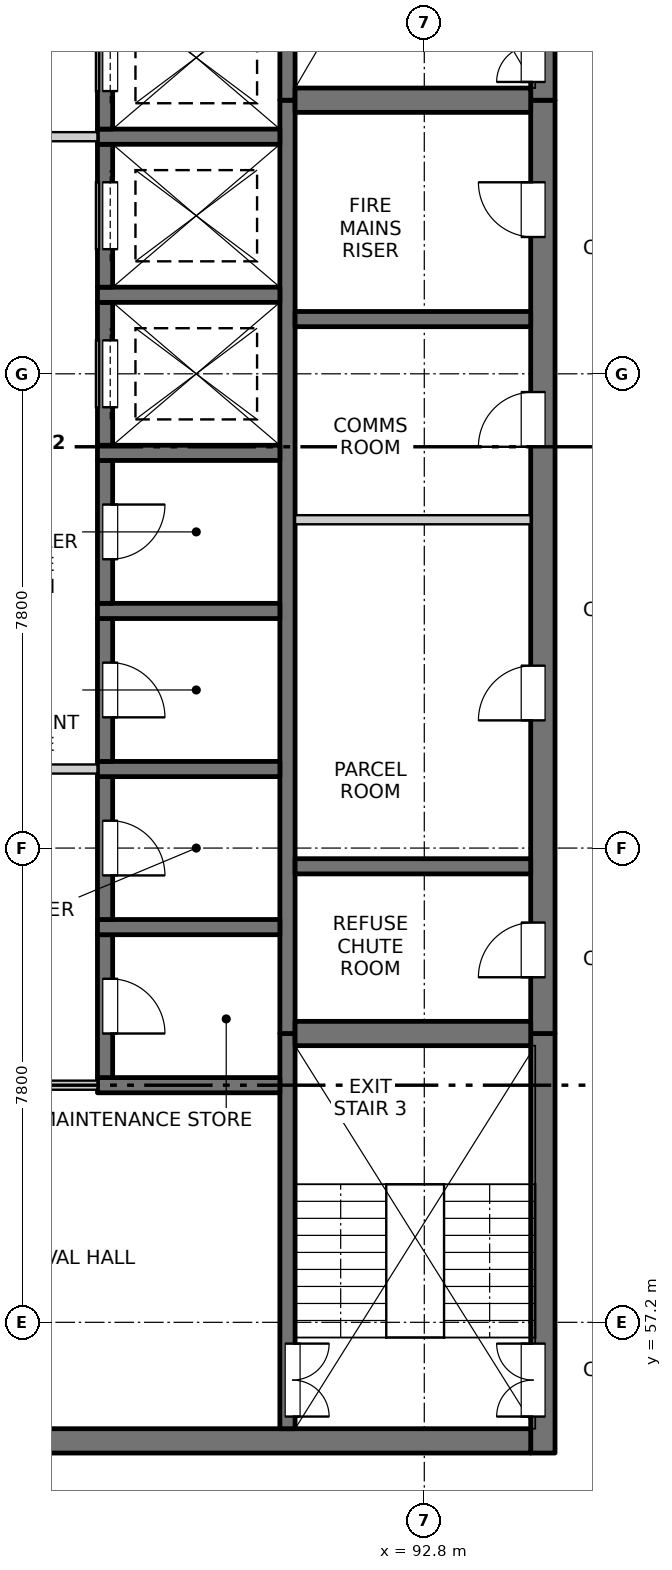
"""IFC4 building model, lengths in metres.
Left out: names, types, materials, properties, quantities, classifications, styles, units other than length and angle.
Written with IfcOpenShell. Run it as: python <this file> out.ifc"""

import sys

from ifc_helpers import new_model, si_unit, direction, frame, frame_2d, origin, place, context, subcontext, project, spatial, rectangle, extrude, element, fill, save


model = new_model("IFC4")
c1 = context("Model", 3, precision=1e-05, world=origin(), true_north=direction((0.0, 1.0)))
c2 = subcontext(c1, "Body", "Model", "MODEL_VIEW")
j1 = project(units=[si_unit("LENGTHUNIT", "METRE"), si_unit("PLANEANGLEUNIT", "RADIAN")], contexts=[c1])
p1 = place(None, origin())
s1 = spatial("IfcSite", under=j1, at=p1, CompositionType="ELEMENT")
p2 = place(p1, origin())
s2 = spatial("IfcBuilding", under=s1, at=p2, CompositionType="ELEMENT")
p3 = place(p2, frame((0.0, 0.0, 200.7)))
s3 = spatial("IfcBuildingStorey", under=s2, at=p3, CompositionType="ELEMENT", Elevation=200.7)
p4 = place(p3, frame((94.75, 55.05, -0.25), z_axis=(0.0, 0.0, 1.0), x_axis=(0.0, 1.0, 0.0)))
e1 = element("IfcWall", 1, at=p4, inside=s3, PredefinedType="SOLIDWALL", context=c2, shape_type="SweptSolid", body=[
    extrude(rectangle(XDim=6.9, YDim=0.4, at=frame_2d((3.45, 0.0))), origin(), (0.0, 0.0, 1.0), 3.4),
])
p5 = place(p4, frame((0.6, 0.0, 0.25)))
e2 = element("IfcOpeningElement", 2, at=p5, cuts=e1, PredefinedType="OPENING", context=c2, shape_type="SweptSolid", body=[
    extrude(rectangle(XDim=1.2, YDim=2.1, at=frame_2d((0.6, 1.05))), frame((0.0, 0.21, 0.0), z_axis=(0.0, -1.0, 0.0), x_axis=(1.0, 0.0, 0.0)), (0.0, 0.0, 1.0), 0.42),
])
p6 = place(p3, frame((94.75, 61.95, -0.25), z_axis=(0.0, 0.0, 1.0), x_axis=(0.0, 1.0, 0.0)))
e3 = element("IfcWall", 3, at=p6, inside=s3, PredefinedType="SOLIDWALL", context=c2, shape_type="SweptSolid", body=[
    extrude(rectangle(XDim=15.35, YDim=0.4, at=frame_2d((7.675, 0.0))), origin(), (0.0, 0.0, 1.0), 3.4),
])
p7 = place(p6, frame((0.925, 0.0, 0.25)))
e4 = element("IfcOpeningElement", 4, at=p7, cuts=e3, PredefinedType="OPENING", context=c2, shape_type="SweptSolid", body=[
    extrude(rectangle(XDim=0.9, YDim=2.1, at=frame_2d((0.45, 1.05))), frame((0.0, 0.21, 0.0), z_axis=(0.0, -1.0, 0.0), x_axis=(1.0, 0.0, 0.0)), (0.0, 0.0, 1.0), 0.42),
])
p8 = place(p6, frame((5.15, 0.0, 0.25)))
e5 = element("IfcOpeningElement", 5, at=p8, cuts=e3, PredefinedType="OPENING", context=c2, shape_type="SweptSolid", body=[
    extrude(rectangle(XDim=0.9, YDim=2.1, at=frame_2d((0.45, 1.05))), frame((0.0, 0.21, 0.0), z_axis=(0.0, -1.0, 0.0), x_axis=(1.0, 0.0, 0.0)), (0.0, 0.0, 1.0), 0.42),
])
p9 = place(p6, frame((9.65, 0.0, 0.25)))
e6 = element("IfcOpeningElement", 6, at=p9, cuts=e3, PredefinedType="OPENING", context=c2, shape_type="SweptSolid", body=[
    extrude(rectangle(XDim=0.9, YDim=2.1, at=frame_2d((0.45, 1.05))), frame((0.0, 0.21, 0.0), z_axis=(0.0, -1.0, 0.0), x_axis=(1.0, 0.0, 0.0)), (0.0, 0.0, 1.0), 0.42),
])
p10 = place(p6, frame((13.1, 0.0, 0.25)))
e7 = element("IfcOpeningElement", 7, at=p10, cuts=e3, PredefinedType="OPENING", context=c2, shape_type="SweptSolid", body=[
    extrude(rectangle(XDim=0.9, YDim=2.1, at=frame_2d((0.45, 1.05))), frame((0.0, 0.21, 0.0), z_axis=(0.0, -1.0, 0.0), x_axis=(1.0, 0.0, 0.0)), (0.0, 0.0, 1.0), 0.42),
])
p11 = place(p3, frame((94.75, 77.3, -0.25), z_axis=(0.0, 0.0, 1.0), x_axis=(0.0, 1.0, 0.0)))
e8 = element("IfcWall", 8, at=p11, inside=s3, PredefinedType="SOLIDWALL", context=c2, shape_type="SweptSolid", body=[
    extrude(rectangle(XDim=7.4, YDim=0.4, at=frame_2d((3.7, 0.0))), origin(), (0.0, 0.0, 1.0), 3.4),
])
p12 = place(p11, frame((0.3, 0.0, 0.25)))
e9 = element("IfcOpeningElement", 9, at=p12, cuts=e8, PredefinedType="OPENING", context=c2, shape_type="SweptSolid", body=[
    extrude(rectangle(XDim=1.2, YDim=2.1, at=frame_2d((0.6, 1.05))), frame((0.0, 0.21, 0.0), z_axis=(0.0, -1.0, 0.0), x_axis=(1.0, 0.0, 0.0)), (0.0, 0.0, 1.0), 0.42),
])
p13 = place(p3, frame((75.45, 55.25, -0.25), z_axis=(0.0, 0.0, 1.0), x_axis=(1.0, 0.0, 0.0)))
e10 = element("IfcWall", 10, at=p13, inside=s3, PredefinedType="SOLIDWALL", context=c2, shape_type="SweptSolid", body=[
    extrude(rectangle(XDim=19.1, YDim=0.4, at=frame_2d((9.55, 0.0))), origin(), (0.0, 0.0, 1.0), 3.4),
])
p14 = place(p13, frame((8.8, 0.0, 0.25)))
e11 = element("IfcOpeningElement", 11, at=p14, cuts=e10, PredefinedType="OPENING", context=c2, shape_type="SweptSolid", body=[
    extrude(rectangle(XDim=1.5, YDim=2.1, at=frame_2d((0.75, 1.05))), frame((0.0, 0.21, 0.0), z_axis=(0.0, -1.0, 0.0), x_axis=(1.0, 0.0, 0.0)), (0.0, 0.0, 1.0), 0.42),
])
p15 = place(p3, frame((90.55, 55.45, -0.25), z_axis=(0.0, 0.0, 1.0), x_axis=(0.0, 1.0, 0.0)))
e12 = element("IfcWall", 12, at=p15, inside=s3, PredefinedType="SOLIDWALL", context=c2, shape_type="SweptSolid", body=[
    extrude(rectangle(XDim=6.5, YDim=0.25, at=frame_2d((3.25, 0.0))), origin(), (0.0, 0.0, 1.0), 3.4),
])
p16 = place(p15, frame((0.2, 0.0, 0.25)))
e13 = element("IfcOpeningElement", 13, at=p16, cuts=e12, PredefinedType="OPENING", context=c2, shape_type="SweptSolid", body=[
    extrude(rectangle(XDim=1.2, YDim=2.1, at=frame_2d((0.6, 1.05))), frame((0.0, 0.135, 0.0), z_axis=(0.0, -1.0, 0.0), x_axis=(1.0, 0.0, 0.0)), (0.0, 0.0, 1.0), 0.27),
])
p17 = place(p3, frame((90.55, 61.95, -0.25), z_axis=(0.0, 0.0, 1.0), x_axis=(0.0, 1.0, 0.0)))
e14 = element("IfcWall", 14, at=p17, inside=s3, PredefinedType="SOLIDWALL", context=c2, shape_type="SweptSolid", body=[
    extrude(rectangle(XDim=15.35, YDim=0.25, at=frame_2d((7.675, 0.0))), origin(), (0.0, 0.0, 1.0), 3.4),
])
p18 = place(p3, frame((90.55, 77.3, -0.25), z_axis=(0.0, 0.0, 1.0), x_axis=(0.0, 1.0, 0.0)))
e15 = element("IfcWall", 15, at=p18, inside=s3, PredefinedType="SOLIDWALL", context=c2, shape_type="SweptSolid", body=[
    extrude(rectangle(XDim=7.0, YDim=0.25, at=frame_2d((3.5, 0.0))), origin(), (0.0, 0.0, 1.0), 3.4),
])
p19 = place(p3, frame((87.425, 61.1, -0.25), z_axis=(0.0, 0.0, 1.0), x_axis=(1.0, 0.0, 0.0)))
e16 = element("IfcWall", 16, at=p19, inside=s3, PredefinedType="SOLIDWALL", context=c2, shape_type="SweptSolid", body=[
    extrude(rectangle(XDim=3.0, YDim=0.25, at=frame_2d((1.5, 0.0))), origin(), (0.0, 0.0, 1.0), 3.4),
])
p20 = place(p3, frame((87.55, 61.225, -0.25), z_axis=(0.0, 0.0, 1.0), x_axis=(0.0, 1.0, 0.0)))
e17 = element("IfcWall", 17, at=p20, inside=s3, PredefinedType="SOLIDWALL", context=c2, shape_type="SweptSolid", body=[
    extrude(rectangle(XDim=2.35, YDim=0.25, at=frame_2d((1.175, 0.0))), origin(), (0.0, 0.0, 1.0), 3.4),
])
p21 = place(p20, frame((0.725, 0.0, 0.25)))
e18 = element("IfcOpeningElement", 18, at=p21, cuts=e17, PredefinedType="OPENING", context=c2, shape_type="SweptSolid", body=[
    extrude(rectangle(XDim=0.9, YDim=2.1, at=frame_2d((0.45, 1.05))), frame((0.0, 0.135, 0.0), z_axis=(0.0, -1.0, 0.0), x_axis=(1.0, 0.0, 0.0)), (0.0, 0.0, 1.0), 0.27),
])
p22 = place(p3, frame((87.425, 63.7, -0.25), z_axis=(0.0, 0.0, 1.0), x_axis=(1.0, 0.0, 0.0)))
e19 = element("IfcWall", 19, at=p22, inside=s3, PredefinedType="SOLIDWALL", context=c2, shape_type="SweptSolid", body=[
    extrude(rectangle(XDim=3.0, YDim=0.25, at=frame_2d((1.5, 0.0))), origin(), (0.0, 0.0, 1.0), 3.4),
])
p23 = place(p3, frame((87.55, 63.825, -0.25), z_axis=(0.0, 0.0, 1.0), x_axis=(0.0, 1.0, 0.0)))
e20 = element("IfcWall", 20, at=p23, inside=s3, PredefinedType="SOLIDWALL", context=c2, shape_type="SweptSolid", body=[
    extrude(rectangle(XDim=2.35, YDim=0.25, at=frame_2d((1.175, 0.0))), origin(), (0.0, 0.0, 1.0), 3.4),
])
p24 = place(p23, frame((0.725, 0.0, 0.25)))
e21 = element("IfcOpeningElement", 21, at=p24, cuts=e20, PredefinedType="OPENING", context=c2, shape_type="SweptSolid", body=[
    extrude(rectangle(XDim=0.9, YDim=2.1, at=frame_2d((0.45, 1.05))), frame((0.0, 0.135, 0.0), z_axis=(0.0, -1.0, 0.0), x_axis=(1.0, 0.0, 0.0)), (0.0, 0.0, 1.0), 0.27),
])
p25 = place(p3, frame((87.425, 66.3, -0.25), z_axis=(0.0, 0.0, 1.0), x_axis=(1.0, 0.0, 0.0)))
e22 = element("IfcWall", 22, at=p25, inside=s3, PredefinedType="SOLIDWALL", context=c2, shape_type="SweptSolid", body=[
    extrude(rectangle(XDim=3.0, YDim=0.25, at=frame_2d((1.5, 0.0))), origin(), (0.0, 0.0, 1.0), 3.4),
])
p26 = place(p3, frame((87.55, 66.425, -0.25), z_axis=(0.0, 0.0, 1.0), x_axis=(0.0, 1.0, 0.0)))
e23 = element("IfcWall", 23, at=p26, inside=s3, PredefinedType="SOLIDWALL", context=c2, shape_type="SweptSolid", body=[
    extrude(rectangle(XDim=2.35, YDim=0.25, at=frame_2d((1.175, 0.0))), origin(), (0.0, 0.0, 1.0), 3.4),
])
p27 = place(p26, frame((0.725, 0.0, 0.25)))
e24 = element("IfcOpeningElement", 24, at=p27, cuts=e23, PredefinedType="OPENING", context=c2, shape_type="SweptSolid", body=[
    extrude(rectangle(XDim=0.9, YDim=2.1, at=frame_2d((0.45, 1.05))), frame((0.0, 0.135, 0.0), z_axis=(0.0, -1.0, 0.0), x_axis=(1.0, 0.0, 0.0)), (0.0, 0.0, 1.0), 0.27),
])
p28 = place(p3, frame((87.425, 68.9, -0.25), z_axis=(0.0, 0.0, 1.0), x_axis=(1.0, 0.0, 0.0)))
e25 = element("IfcWall", 25, at=p28, inside=s3, PredefinedType="SOLIDWALL", context=c2, shape_type="SweptSolid", body=[
    extrude(rectangle(XDim=3.0, YDim=0.25, at=frame_2d((1.5, 0.0))), origin(), (0.0, 0.0, 1.0), 3.4),
])
p29 = place(p3, frame((87.55, 69.025, -0.25), z_axis=(0.0, 0.0, 1.0), x_axis=(0.0, 1.0, 0.0)))
e26 = element("IfcWall", 26, at=p29, inside=s3, PredefinedType="SOLIDWALL", context=c2, shape_type="SweptSolid", body=[
    extrude(rectangle(XDim=2.35, YDim=0.25, at=frame_2d((1.175, 0.0))), origin(), (0.0, 0.0, 1.0), 3.4),
])
p30 = place(p29, frame((0.725, 0.0, 0.25)))
e27 = element("IfcOpeningElement", 27, at=p30, cuts=e26, PredefinedType="OPENING", context=c2, shape_type="SweptSolid", body=[
    extrude(rectangle(XDim=0.9, YDim=2.1, at=frame_2d((0.45, 1.05))), frame((0.0, 0.135, 0.0), z_axis=(0.0, -1.0, 0.0), x_axis=(1.0, 0.0, 0.0)), (0.0, 0.0, 1.0), 0.27),
])
p31 = place(p3, frame((87.425, 71.5, -0.25), z_axis=(0.0, 0.0, 1.0), x_axis=(1.0, 0.0, 0.0)))
e28 = element("IfcWall", 28, at=p31, inside=s3, PredefinedType="SOLIDWALL", context=c2, shape_type="SweptSolid", body=[
    extrude(rectangle(XDim=3.0, YDim=0.25, at=frame_2d((1.5, 0.0))), origin(), (0.0, 0.0, 1.0), 3.4),
])
p32 = place(p3, frame((87.55, 71.625, -0.25), z_axis=(0.0, 0.0, 1.0), x_axis=(0.0, 1.0, 0.0)))
e29 = element("IfcWall", 29, at=p32, inside=s3, PredefinedType="SOLIDWALL", context=c2, shape_type="SweptSolid", body=[
    extrude(rectangle(XDim=2.35, YDim=0.25, at=frame_2d((1.175, 0.0))), origin(), (0.0, 0.0, 1.0), 3.4),
])
p33 = place(p32, frame((0.625, 0.0, 0.25)))
e30 = element("IfcOpeningElement", 30, at=p33, cuts=e29, PredefinedType="OPENING", context=c2, shape_type="SweptSolid", body=[
    extrude(rectangle(XDim=1.1, YDim=2.1, at=frame_2d((0.55, 1.05))), frame((0.0, 0.135, 0.0), z_axis=(0.0, -1.0, 0.0), x_axis=(1.0, 0.0, 0.0)), (0.0, 0.0, 1.0), 0.27),
])
p34 = place(p3, frame((87.425, 74.1, -0.25), z_axis=(0.0, 0.0, 1.0), x_axis=(1.0, 0.0, 0.0)))
e31 = element("IfcWall", 31, at=p34, inside=s3, PredefinedType="SOLIDWALL", context=c2, shape_type="SweptSolid", body=[
    extrude(rectangle(XDim=3.0, YDim=0.25, at=frame_2d((1.5, 0.0))), origin(), (0.0, 0.0, 1.0), 3.4),
])
p35 = place(p3, frame((87.55, 74.225, -0.25), z_axis=(0.0, 0.0, 1.0), x_axis=(0.0, 1.0, 0.0)))
e32 = element("IfcWall", 32, at=p35, inside=s3, PredefinedType="SOLIDWALL", context=c2, shape_type="SweptSolid", body=[
    extrude(rectangle(XDim=2.35, YDim=0.25, at=frame_2d((1.175, 0.0))), origin(), (0.0, 0.0, 1.0), 3.4),
])
p36 = place(p35, frame((0.625, 0.0, 0.25)))
e33 = element("IfcOpeningElement", 33, at=p36, cuts=e32, PredefinedType="OPENING", context=c2, shape_type="SweptSolid", body=[
    extrude(rectangle(XDim=1.1, YDim=2.1, at=frame_2d((0.55, 1.05))), frame((0.0, 0.135, 0.0), z_axis=(0.0, -1.0, 0.0), x_axis=(1.0, 0.0, 0.0)), (0.0, 0.0, 1.0), 0.27),
])
p37 = place(p3, frame((87.425, 76.7, -0.25), z_axis=(0.0, 0.0, 1.0), x_axis=(1.0, 0.0, 0.0)))
e34 = element("IfcWall", 34, at=p37, inside=s3, PredefinedType="SOLIDWALL", context=c2, shape_type="SweptSolid", body=[
    extrude(rectangle(XDim=3.0, YDim=0.25, at=frame_2d((1.5, 0.0))), origin(), (0.0, 0.0, 1.0), 3.4),
])
p38 = place(p3, frame((87.55, 76.825, -0.25), z_axis=(0.0, 0.0, 1.0), x_axis=(0.0, 1.0, 0.0)))
e35 = element("IfcWall", 35, at=p38, inside=s3, PredefinedType="SOLIDWALL", context=c2, shape_type="SweptSolid", body=[
    extrude(rectangle(XDim=2.35, YDim=0.25, at=frame_2d((1.175, 0.0))), origin(), (0.0, 0.0, 1.0), 3.4),
])
p39 = place(p38, frame((0.625, 0.0, 0.25)))
e36 = element("IfcOpeningElement", 36, at=p39, cuts=e35, PredefinedType="OPENING", context=c2, shape_type="SweptSolid", body=[
    extrude(rectangle(XDim=1.1, YDim=2.1, at=frame_2d((0.55, 1.05))), frame((0.0, 0.135, 0.0), z_axis=(0.0, -1.0, 0.0), x_axis=(1.0, 0.0, 0.0)), (0.0, 0.0, 1.0), 0.27),
])
p40 = place(p3, frame((90.675, 61.95, -0.25), z_axis=(0.0, 0.0, 1.0), x_axis=(1.0, 0.0, 0.0)))
e37 = element("IfcWall", 37, at=p40, inside=s3, PredefinedType="SOLIDWALL", context=c2, shape_type="SweptSolid", body=[
    extrude(rectangle(XDim=3.875, YDim=0.4, at=frame_2d((1.938, 0.0))), origin(), (0.0, 0.0, 1.0), 3.4),
])
for number, where, z_axis, x_axis in (
    (38, (90.675, 64.7, -0.25), (0.0, 0.0, 1.0), (1.0, 0.0, 0.0)),
    (39, (90.675, 73.7, -0.25), (0.0, 0.0, 1.0), (1.0, 0.0, 0.0)),
):
    element("IfcWall", number, at=place(p3, frame(where, z_axis=z_axis, x_axis=x_axis)), inside=s3, PredefinedType="SOLIDWALL", context=c2, shape_type="SweptSolid", body=[
        extrude(rectangle(XDim=3.875, YDim=0.25, at=frame_2d((1.938, 0.0))), origin(), (0.0, 0.0, 1.0), 3.4),
    ])
p41 = place(p3, frame((90.675, 77.3, -0.25), z_axis=(0.0, 0.0, 1.0), x_axis=(1.0, 0.0, 0.0)))
e40 = element("IfcWall", 40, at=p41, inside=s3, PredefinedType="SOLIDWALL", context=c2, shape_type="SweptSolid", body=[
    extrude(rectangle(XDim=3.875, YDim=0.4, at=frame_2d((1.938, 0.0))), origin(), (0.0, 0.0, 1.0), 3.4),
])
p42 = place(p3, frame((82.575, 61.1, 0.0), z_axis=(0.0, 0.0, 1.0), x_axis=(1.0, 0.0, 0.0)))
e41 = element("IfcWall", 41, at=p42, inside=s3, PredefinedType="PARTITIONING", context=c2, shape_type="SweptSolid", body=[
    extrude(rectangle(XDim=4.85, YDim=0.15, at=frame_2d((2.425, 0.0))), origin(), (0.0, 0.0, 1.0), 3.15),
])
p43 = place(p42, frame((1.525, 0.0, 0.0)))
e42 = element("IfcOpeningElement", 42, at=p43, cuts=e41, PredefinedType="OPENING", context=c2, shape_type="SweptSolid", body=[
    extrude(rectangle(XDim=1.8, YDim=2.1, at=frame_2d((0.9, 1.05))), frame((0.0, 0.085, 0.0), z_axis=(0.0, -1.0, 0.0), x_axis=(1.0, 0.0, 0.0)), (0.0, 0.0, 1.0), 0.17),
])
p44 = place(p3, frame((82.575, 66.3, 0.0), z_axis=(0.0, 0.0, 1.0), x_axis=(1.0, 0.0, 0.0)))
e43 = element("IfcWall", 43, at=p44, inside=s3, PredefinedType="PARTITIONING", context=c2, shape_type="SweptSolid", body=[
    extrude(rectangle(XDim=4.85, YDim=0.15, at=frame_2d((2.425, 0.0))), origin(), (0.0, 0.0, 1.0), 3.15),
])
p45 = place(p44, frame((1.525, 0.0, 0.0)))
e44 = element("IfcOpeningElement", 44, at=p45, cuts=e43, PredefinedType="OPENING", context=c2, shape_type="SweptSolid", body=[
    extrude(rectangle(XDim=1.8, YDim=2.1, at=frame_2d((0.9, 1.05))), frame((0.0, 0.085, 0.0), z_axis=(0.0, -1.0, 0.0), x_axis=(1.0, 0.0, 0.0)), (0.0, 0.0, 1.0), 0.17),
])
p46 = place(p3, frame((90.675, 70.4, 0.0), z_axis=(0.0, 0.0, 1.0), x_axis=(1.0, 0.0, 0.0)))
e45 = element("IfcWall", 45, at=p46, inside=s3, PredefinedType="PARTITIONING", context=c2, shape_type="SweptSolid", body=[
    extrude(rectangle(XDim=3.875, YDim=0.15, at=frame_2d((1.938, 0.0))), origin(), (0.0, 0.0, 1.0), 3.15),
])
p47 = place(p3, frame((82.575, 76.7, 0.0), z_axis=(0.0, 0.0, 1.0), x_axis=(1.0, 0.0, 0.0)))
e46 = element("IfcWall", 46, at=p47, inside=s3, PredefinedType="PARTITIONING", context=c2, shape_type="SweptSolid", body=[
    extrude(rectangle(XDim=4.85, YDim=0.15, at=frame_2d((2.425, 0.0))), origin(), (0.0, 0.0, 1.0), 3.15),
])
p48 = place(p47, frame((1.525, 0.0, 0.0)))
e47 = element("IfcOpeningElement", 47, at=p48, cuts=e46, PredefinedType="OPENING", context=c2, shape_type="SweptSolid", body=[
    extrude(rectangle(XDim=1.8, YDim=2.1, at=frame_2d((0.9, 1.05))), frame((0.0, 0.085, 0.0), z_axis=(0.0, -1.0, 0.0), x_axis=(1.0, 0.0, 0.0)), (0.0, 0.0, 1.0), 0.17),
])
p49 = place(p16, origin())
e48 = element("IfcDoor", 48, at=p49, inside=s3, OperationType="DOUBLE_DOOR_SINGLE_SWING", PredefinedType="DOOR", context=c2, shape_type="SweptSolid", body=[
    extrude(rectangle(XDim=1.2, YDim=2.1, at=frame_2d((0.6, 1.05))), frame((0.0, -0.06, 0.0), z_axis=(0.0, -1.0, 0.0), x_axis=(1.0, 0.0, 0.0)), (0.0, 0.0, 1.0), 0.05),
])
fill(e13, e48)
p50 = place(p5, origin())
e49 = element("IfcDoor", 49, at=p50, inside=s3, OperationType="DOUBLE_DOOR_SINGLE_SWING", PredefinedType="DOOR", context=c2, shape_type="SweptSolid", body=[
    extrude(rectangle(XDim=1.2, YDim=2.1, at=frame_2d((0.6, 1.05))), frame((0.0, 0.185, 0.0), z_axis=(0.0, -1.0, 0.0), x_axis=(1.0, 0.0, 0.0)), (0.0, 0.0, 1.0), 0.05),
])
fill(e2, e49)
p51 = place(p21, origin())
e50 = element("IfcDoor", 50, at=p51, inside=s3, OperationType="SINGLE_SWING_RIGHT", PredefinedType="DOOR", context=c2, shape_type="SweptSolid", body=[
    extrude(rectangle(XDim=0.9, YDim=2.1, at=frame_2d((0.45, 1.05))), frame((0.0, -0.06, 0.0), z_axis=(0.0, -1.0, 0.0), x_axis=(1.0, 0.0, 0.0)), (0.0, 0.0, 1.0), 0.05),
])
fill(e18, e50)
p52 = place(p7, origin())
e51 = element("IfcDoor", 51, at=p52, inside=s3, OperationType="SINGLE_SWING_LEFT", PredefinedType="DOOR", context=c2, shape_type="SweptSolid", body=[
    extrude(rectangle(XDim=0.9, YDim=2.1, at=frame_2d((0.45, 1.05))), frame((0.0, 0.185, 0.0), z_axis=(0.0, -1.0, 0.0), x_axis=(1.0, 0.0, 0.0)), (0.0, 0.0, 1.0), 0.05),
])
fill(e4, e51)
p53 = place(p24, origin())
e52 = element("IfcDoor", 52, at=p53, inside=s3, OperationType="SINGLE_SWING_RIGHT", PredefinedType="DOOR", context=c2, shape_type="SweptSolid", body=[
    extrude(rectangle(XDim=0.9, YDim=2.1, at=frame_2d((0.45, 1.05))), frame((0.0, -0.06, 0.0), z_axis=(0.0, -1.0, 0.0), x_axis=(1.0, 0.0, 0.0)), (0.0, 0.0, 1.0), 0.05),
])
fill(e21, e52)
p54 = place(p8, origin())
e53 = element("IfcDoor", 53, at=p54, inside=s3, OperationType="SINGLE_SWING_LEFT", PredefinedType="DOOR", context=c2, shape_type="SweptSolid", body=[
    extrude(rectangle(XDim=0.9, YDim=2.1, at=frame_2d((0.45, 1.05))), frame((0.0, 0.185, 0.0), z_axis=(0.0, -1.0, 0.0), x_axis=(1.0, 0.0, 0.0)), (0.0, 0.0, 1.0), 0.05),
])
fill(e5, e53)
p55 = place(p27, origin())
e54 = element("IfcDoor", 54, at=p55, inside=s3, OperationType="SINGLE_SWING_RIGHT", PredefinedType="DOOR", context=c2, shape_type="SweptSolid", body=[
    extrude(rectangle(XDim=0.9, YDim=2.1, at=frame_2d((0.45, 1.05))), frame((0.0, -0.06, 0.0), z_axis=(0.0, -1.0, 0.0), x_axis=(1.0, 0.0, 0.0)), (0.0, 0.0, 1.0), 0.05),
])
fill(e24, e54)
p56 = place(p30, origin())
e55 = element("IfcDoor", 55, at=p56, inside=s3, OperationType="SINGLE_SWING_LEFT", PredefinedType="DOOR", context=c2, shape_type="SweptSolid", body=[
    extrude(rectangle(XDim=0.9, YDim=2.1, at=frame_2d((0.45, 1.05))), frame((0.0, -0.06, 0.0), z_axis=(0.0, -1.0, 0.0), x_axis=(1.0, 0.0, 0.0)), (0.0, 0.0, 1.0), 0.05),
])
fill(e27, e55)
p57 = place(p9, origin())
e56 = element("IfcDoor", 56, at=p57, inside=s3, OperationType="SINGLE_SWING_LEFT", PredefinedType="DOOR", context=c2, shape_type="SweptSolid", body=[
    extrude(rectangle(XDim=0.9, YDim=2.1, at=frame_2d((0.45, 1.05))), frame((0.0, 0.185, 0.0), z_axis=(0.0, -1.0, 0.0), x_axis=(1.0, 0.0, 0.0)), (0.0, 0.0, 1.0), 0.05),
])
fill(e6, e56)
p58 = place(p33, origin())
e57 = element("IfcDoor", 57, at=p58, inside=s3, OperationType="SLIDING_TO_LEFT", PredefinedType="DOOR", context=c2, shape_type="SweptSolid", body=[
    extrude(rectangle(XDim=1.1, YDim=2.1, at=frame_2d((0.55, 1.05))), frame((0.0, -0.06, 0.0), z_axis=(0.0, -1.0, 0.0), x_axis=(1.0, 0.0, 0.0)), (0.0, 0.0, 1.0), 0.05),
])
fill(e30, e57)
p59 = place(p36, origin())
e58 = element("IfcDoor", 58, at=p59, inside=s3, OperationType="SLIDING_TO_LEFT", PredefinedType="DOOR", context=c2, shape_type="SweptSolid", body=[
    extrude(rectangle(XDim=1.1, YDim=2.1, at=frame_2d((0.55, 1.05))), frame((0.0, -0.06, 0.0), z_axis=(0.0, -1.0, 0.0), x_axis=(1.0, 0.0, 0.0)), (0.0, 0.0, 1.0), 0.05),
])
fill(e33, e58)
p60 = place(p10, origin())
e59 = element("IfcDoor", 59, at=p60, inside=s3, OperationType="SINGLE_SWING_RIGHT", PredefinedType="DOOR", context=c2, shape_type="SweptSolid", body=[
    extrude(rectangle(XDim=0.9, YDim=2.1, at=frame_2d((0.45, 1.05))), frame((0.0, 0.185, 0.0), z_axis=(0.0, -1.0, 0.0), x_axis=(1.0, 0.0, 0.0)), (0.0, 0.0, 1.0), 0.05),
])
fill(e7, e59)
p61 = place(p39, origin())
e60 = element("IfcDoor", 60, at=p61, inside=s3, OperationType="SLIDING_TO_LEFT", PredefinedType="DOOR", context=c2, shape_type="SweptSolid", body=[
    extrude(rectangle(XDim=1.1, YDim=2.1, at=frame_2d((0.55, 1.05))), frame((0.0, -0.06, 0.0), z_axis=(0.0, -1.0, 0.0), x_axis=(1.0, 0.0, 0.0)), (0.0, 0.0, 1.0), 0.05),
])
fill(e36, e60)
p62 = place(p12, origin())
e61 = element("IfcDoor", 61, at=p62, inside=s3, OperationType="DOUBLE_DOOR_SINGLE_SWING", PredefinedType="DOOR", context=c2, shape_type="SweptSolid", body=[
    extrude(rectangle(XDim=1.2, YDim=2.1, at=frame_2d((0.6, 1.05))), frame((0.0, 0.185, 0.0), z_axis=(0.0, -1.0, 0.0), x_axis=(1.0, 0.0, 0.0)), (0.0, 0.0, 1.0), 0.05),
])
fill(e9, e61)
save(model, sys.argv[1])
